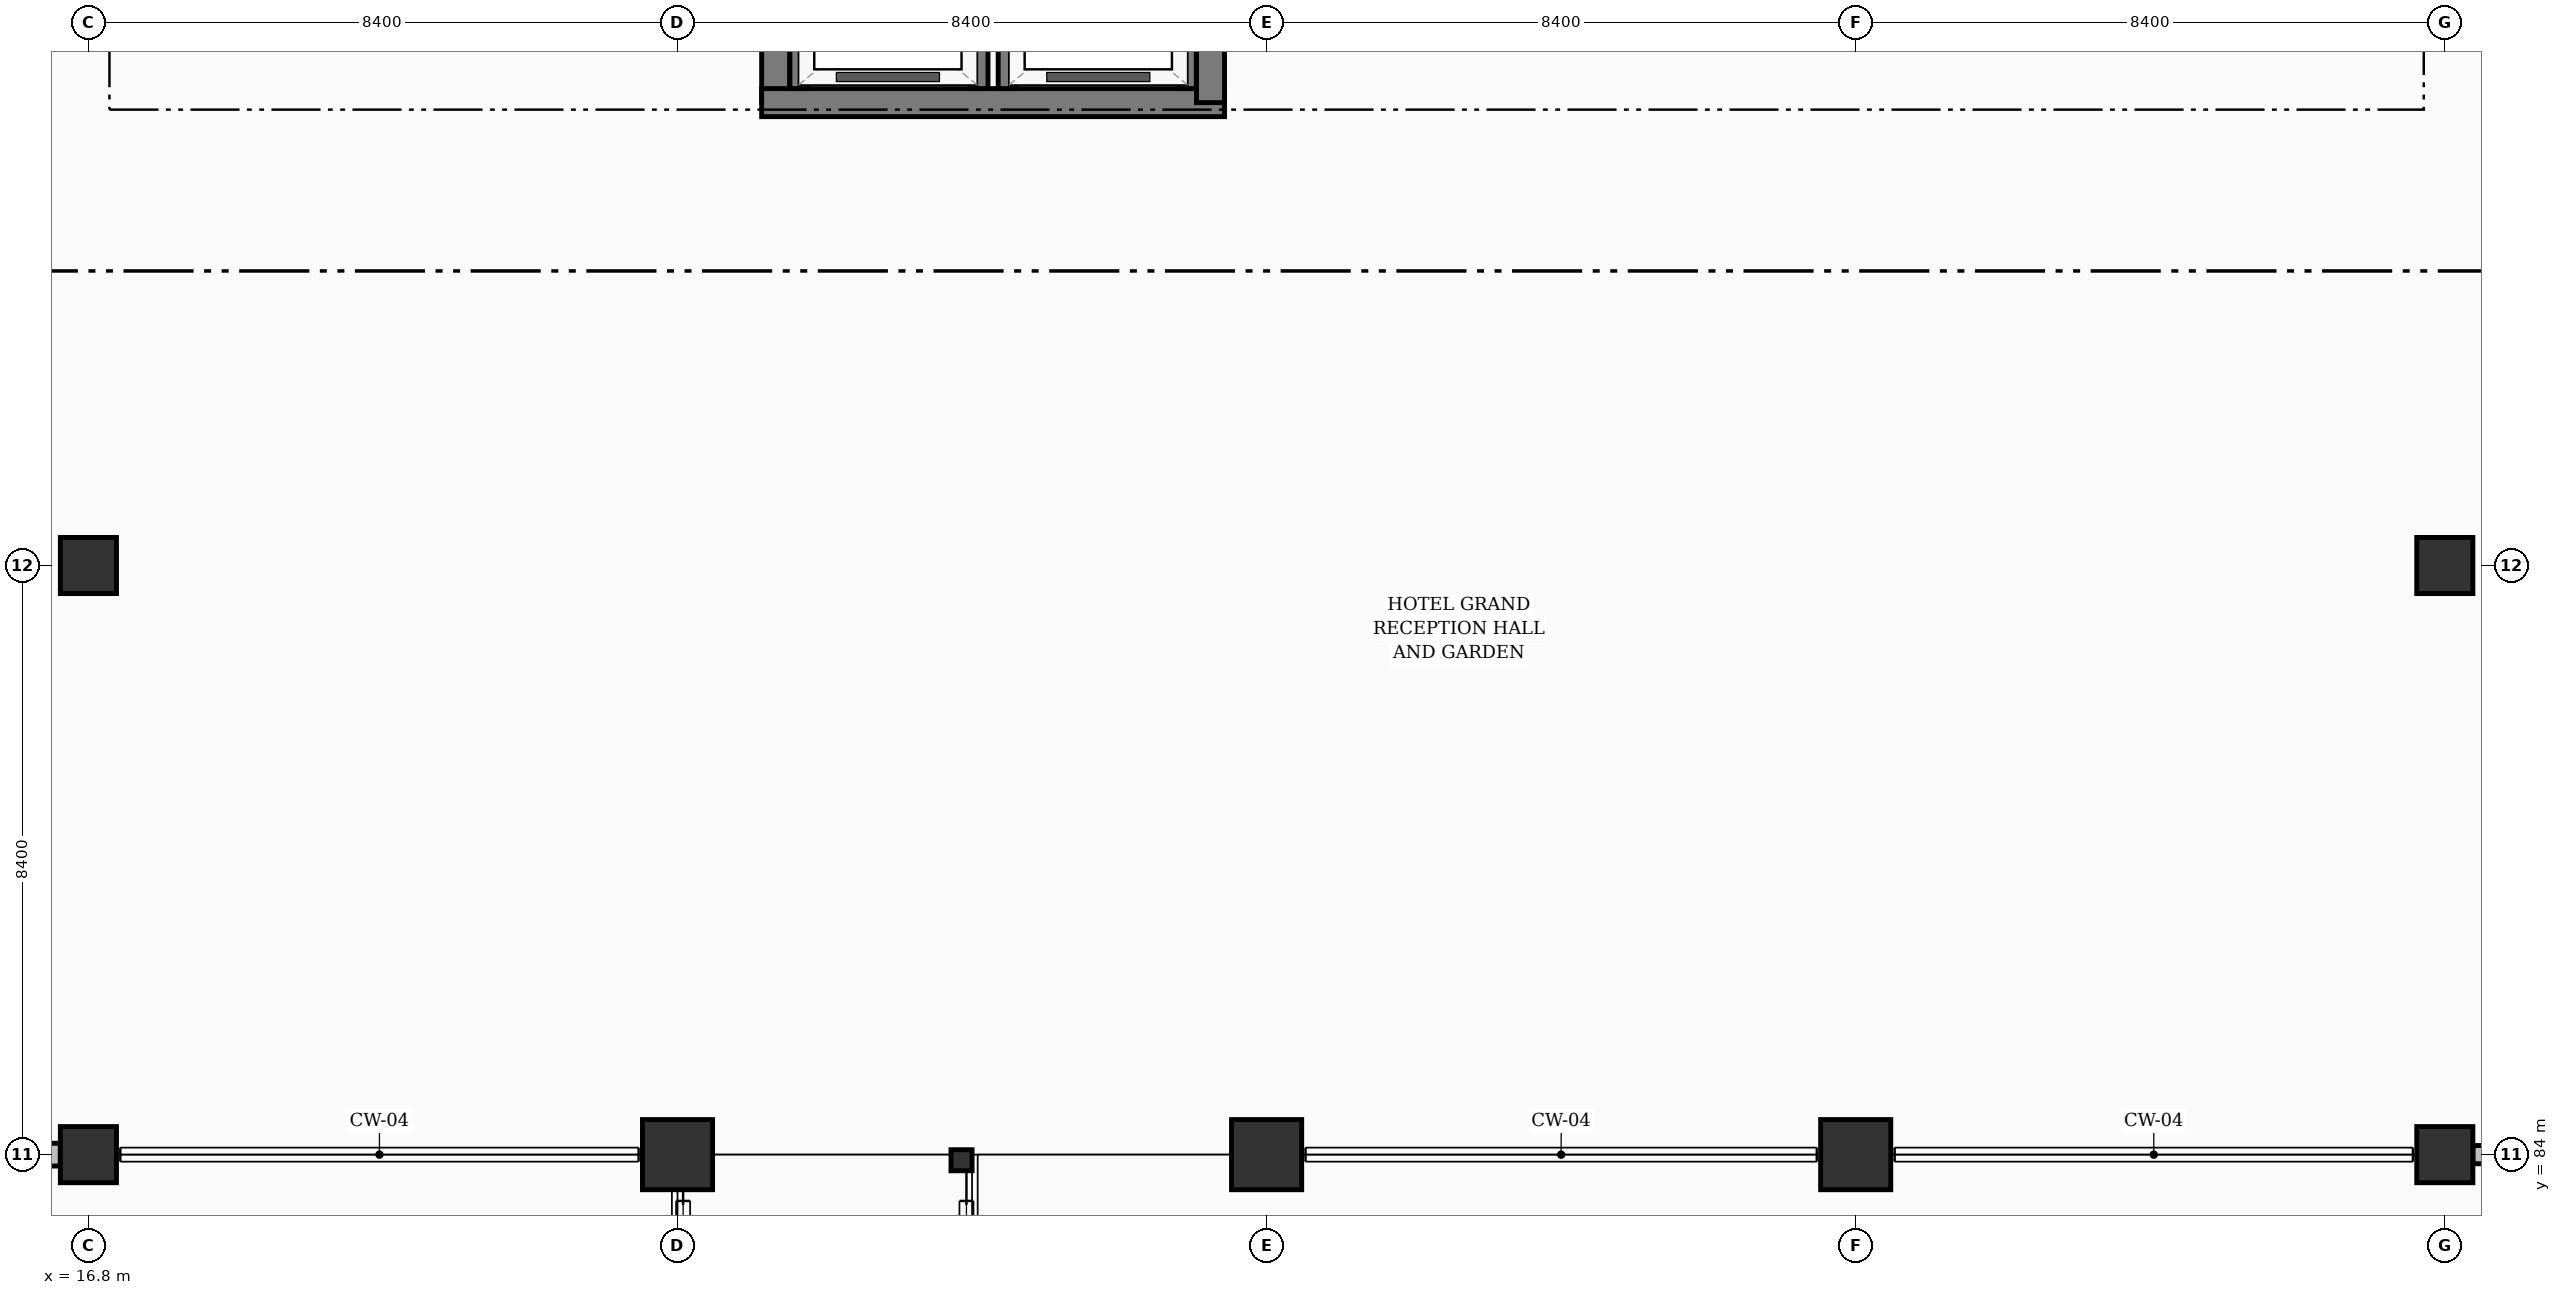
"""IFC4 building model, lengths in metres.
Left out: names, types, materials, properties, quantities, classifications, styles, units other than length and angle.
Written with IfcOpenShell. Run it as: python <this file> out.ifc"""

import sys

from ifc_helpers import new_model, si_unit, direction, frame, frame_2d, origin, origin_2d, place, context, subcontext, project, spatial, rectangle, hollow_rectangle, extrude, element, save


model = new_model("IFC4")
c1 = context("Model", 3, precision=1e-05, world=origin(), true_north=direction((0.0, 1.0)))
c2 = subcontext(c1, "Body", "Model", "MODEL_VIEW")
j1 = project(units=[si_unit("LENGTHUNIT", "METRE"), si_unit("PLANEANGLEUNIT", "RADIAN")], contexts=[c1])
p1 = place(None, origin())
s1 = spatial("IfcSite", under=j1, at=p1, CompositionType="ELEMENT")
p2 = place(p1, origin())
s2 = spatial("IfcBuilding", under=s1, at=p2, CompositionType="ELEMENT")
p3 = place(p2, origin())
s3 = spatial("IfcBuildingStorey", under=s2, at=p3, CompositionType="ELEMENT", Elevation=0.0)
for number, where, z_axis, x_axis in (
    (1, (16.8, 84.0, 0.0), (0.0, 0.0, 1.0), (1.0, 0.0, 0.0)),
    (2, (16.8, 92.4, 0.0), (0.0, 0.0, 1.0), (1.0, 0.0, 0.0)),
):
    element("IfcColumn", number, at=place(p3, frame(where, z_axis=z_axis, x_axis=x_axis)), inside=s3, PredefinedType="COLUMN", context=c2, shape_type="SweptSolid", body=[
        extrude(rectangle(XDim=0.8, YDim=0.8, at=origin_2d()), origin(), (0.0, 0.0, 1.0), 3.92),
    ])
for number, where, z_axis, x_axis in (
    (3, (25.2, 84.0, 0.0), (0.0, 0.0, 1.0), (1.0, 0.0, 0.0)),
    (4, (33.6, 84.0, 0.0), (0.0, 0.0, 1.0), (1.0, 0.0, 0.0)),
    (5, (42.0, 84.0, 0.0), (0.0, 0.0, 1.0), (1.0, 0.0, 0.0)),
):
    element("IfcColumn", number, at=place(p3, frame(where, z_axis=z_axis, x_axis=x_axis)), inside=s3, PredefinedType="COLUMN", context=c2, shape_type="SweptSolid", body=[
        extrude(rectangle(XDim=1.0, YDim=1.0, at=origin_2d()), origin(), (0.0, 0.0, 1.0), 3.92),
    ])
for number, where, z_axis, x_axis in (
    (6, (50.4, 84.0, 0.0), (0.0, 0.0, 1.0), (1.0, 0.0, 0.0)),
    (7, (50.4, 92.4, 0.0), (0.0, 0.0, 1.0), (1.0, 0.0, 0.0)),
):
    element("IfcColumn", number, at=place(p3, frame(where, z_axis=z_axis, x_axis=x_axis)), inside=s3, PredefinedType="COLUMN", context=c2, shape_type="SweptSolid", body=[
        extrude(rectangle(XDim=0.8, YDim=0.8, at=origin_2d()), origin(), (0.0, 0.0, 1.0), 3.92),
    ])
p4 = place(p3, frame((26.6, 99.0, 0.0), z_axis=(0.0, 0.0, 1.0), x_axis=(0.0, 1.0, 0.0)))
e8 = element("IfcWall", 8, at=p4, inside=s3, PredefinedType="SHEAR", context=c2, shape_type="SweptSolid", body=[
    extrude(rectangle(XDim=6.15, YDim=0.4, at=frame_2d((3.075, 0.0))), origin(), (0.0, 0.0, 1.0), 3.64),
])
p5 = place(p3, frame((26.4, 99.0, 0.0), z_axis=(0.0, 0.0, 1.0), x_axis=(1.0, 0.0, 0.0)))
e9 = element("IfcWall", 9, at=p5, inside=s3, PredefinedType="SHEAR", context=c2, shape_type="SweptSolid", body=[
    extrude(rectangle(XDim=6.6, YDim=0.4, at=frame_2d((3.3, 0.0))), origin(), (0.0, 0.0, 1.0), 3.64),
])
p6 = place(p3, frame((32.8, 99.0, 0.0), z_axis=(0.0, 0.0, 1.0), x_axis=(0.0, 1.0, 0.0)))
e10 = element("IfcWall", 10, at=p6, inside=s3, PredefinedType="SHEAR", context=c2, shape_type="SweptSolid", body=[
    extrude(rectangle(XDim=6.15, YDim=0.4, at=frame_2d((3.075, 0.0))), origin(), (0.0, 0.0, 1.0), 3.64),
])
p7 = place(p3, frame((29.25, 83.92, 0.0), z_axis=(0.0, 0.0, 1.0), x_axis=(1.0, 0.0, 0.0)))
e11 = element("IfcColumn", 11, at=p7, inside=s3, PredefinedType="COLUMN", context=c2, shape_type="SweptSolid", body=[
    extrude(hollow_rectangle(XDim=0.3, YDim=0.3, WallThickness=0.016, at=origin_2d()), origin(), (0.0, 0.0, 1.0), 3.92),
])
p8 = place(p3, frame((8.801, 84.0, 0.0), z_axis=(0.0, 0.0, 1.0), x_axis=(1.0, 0.0, 0.0)))
e12 = element("IfcWall", 12, at=p8, inside=s3, PredefinedType="SOLIDWALL", context=c2, shape_type="SweptSolid", body=[
    extrude(rectangle(XDim=7.598, YDim=0.325, at=frame_2d((3.799, 0.0))), origin(), (0.0, 0.0, 1.0), 2.825),
])
p9 = place(p8, frame((1.249, 0.0, 0.0)))
e13 = element("IfcOpeningElement", 13, at=p9, cuts=e12, PredefinedType="OPENING", context=c2, shape_type="SweptSolid", body=[
    extrude(rectangle(XDim=1.9, YDim=2.2, at=frame_2d((0.95, 1.1))), frame((0.0, 0.172, 0.0), z_axis=(0.0, -1.0, 0.0), x_axis=(1.0, 0.0, 0.0)), (0.0, 0.0, 1.0), 0.345),
])
p10 = place(p8, frame((4.098, 0.0, 0.0)))
e14 = element("IfcOpeningElement", 14, at=p10, cuts=e12, PredefinedType="OPENING", context=c2, shape_type="SweptSolid", body=[
    extrude(rectangle(XDim=1.95, YDim=2.25, at=frame_2d((0.975, 1.125))), frame((0.0, 0.172, 0.0), z_axis=(0.0, -1.0, 0.0), x_axis=(1.0, 0.0, 0.0)), (0.0, 0.0, 1.0), 0.345),
])
p11 = place(p3, frame((50.801, 84.0, 0.0), z_axis=(0.0, 0.0, 1.0), x_axis=(1.0, 0.0, 0.0)))
e15 = element("IfcWall", 15, at=p11, inside=s3, PredefinedType="SOLIDWALL", context=c2, shape_type="SweptSolid", body=[
    extrude(rectangle(XDim=7.598, YDim=0.26, at=frame_2d((3.799, 0.0))), origin(), (0.0, 0.0, 1.0), 2.825),
])
p12 = place(p11, frame((2.399, 0.0, 0.3)))
e16 = element("IfcOpeningElement", 16, at=p12, cuts=e15, PredefinedType="OPENING", context=c2, shape_type="SweptSolid", body=[
    extrude(rectangle(XDim=0.7, YDim=1.9, at=frame_2d((0.35, 0.95))), frame((0.0, 0.14, 0.0), z_axis=(0.0, -1.0, 0.0), x_axis=(1.0, 0.0, 0.0)), (0.0, 0.0, 1.0), 0.28),
])
p13 = place(p11, frame((4.499, 0.0, 0.3)))
e17 = element("IfcOpeningElement", 17, at=p13, cuts=e15, PredefinedType="OPENING", context=c2, shape_type="SweptSolid", body=[
    extrude(rectangle(XDim=0.7, YDim=1.9, at=frame_2d((0.35, 0.95))), frame((0.0, 0.14, 0.0), z_axis=(0.0, -1.0, 0.0), x_axis=(1.0, 0.0, 0.0)), (0.0, 0.0, 1.0), 0.28),
])
for number, where, z_axis, x_axis in (
    (18, (26.93, 99.2, 0.0), (0.0, 0.0, 1.0), (0.0, 1.0, 0.0)),
    (19, (29.5, 99.2, 0.0), (0.0, 0.0, 1.0), (0.0, 1.0, 0.0)),
    (20, (29.9, 99.2, 0.0), (0.0, 0.0, 1.0), (0.0, 1.0, 0.0)),
    (21, (32.47, 99.2, 0.0), (0.0, 0.0, 1.0), (0.0, 1.0, 0.0)),
):
    element("IfcWall", number, at=place(p3, frame(where, z_axis=z_axis, x_axis=x_axis)), inside=s3, PredefinedType="SOLIDWALL", context=c2, shape_type="SweptSolid", body=[
        extrude(rectangle(XDim=2.2, YDim=0.255, at=frame_2d((1.1, 0.0))), origin(), (0.0, 0.0, 1.0), 3.64),
    ])
save(model, sys.argv[1])
